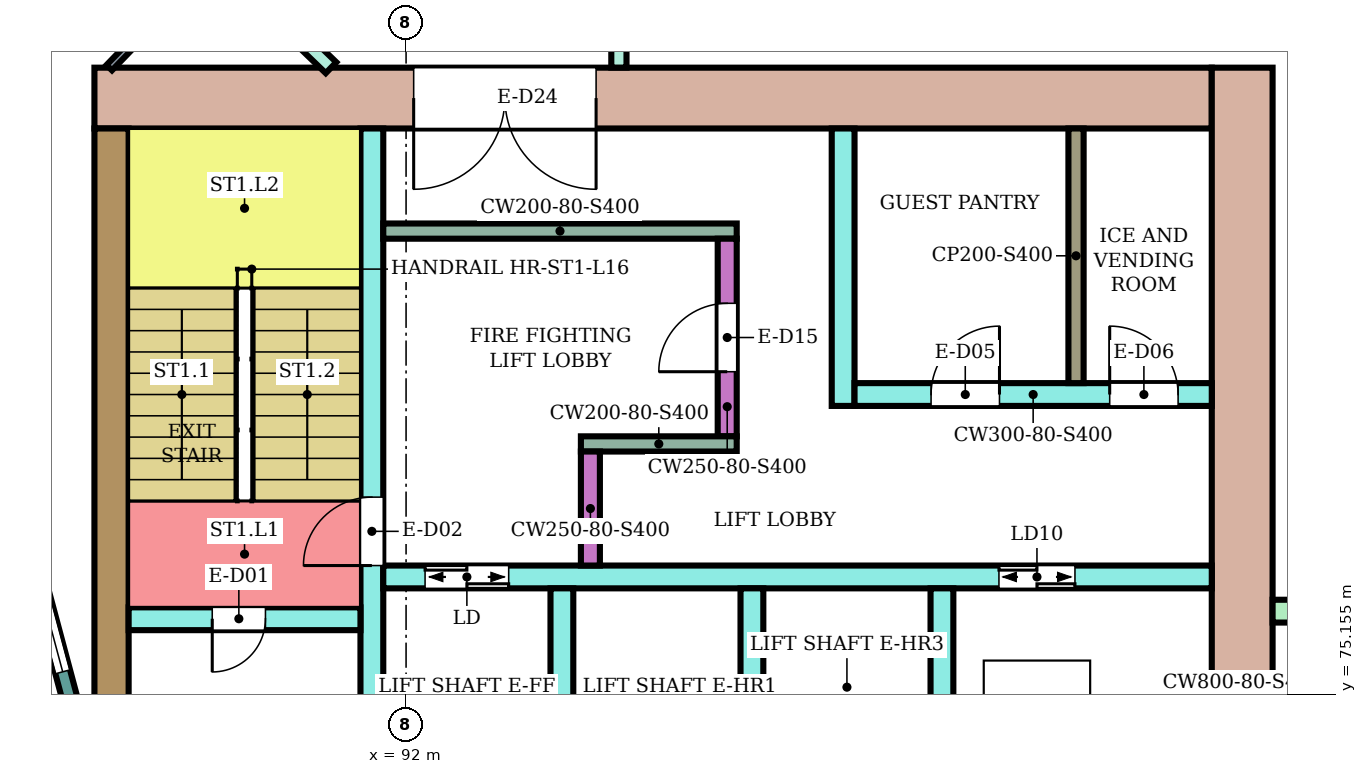
"""IFC4 building model, lengths in metres.
Left out: names, types, materials, properties, quantities, classifications, styles, units other than length and angle.
Written with IfcOpenShell. Run it as: python <this file> out.ifc"""

import sys

from ifc_helpers import new_model, si_unit, direction, frame, frame_2d, origin, place, context, subcontext, project, spatial, rectangle, extrude, element, fill, save


model = new_model("IFC4")
c1 = context("Model", 3, precision=1e-05, world=origin(), true_north=direction((0.0, 1.0)))
c2 = subcontext(c1, "Body", "Model", "MODEL_VIEW")
j1 = project(units=[si_unit("LENGTHUNIT", "METRE"), si_unit("PLANEANGLEUNIT", "RADIAN")], contexts=[c1])
p1 = place(None, origin())
s1 = spatial("IfcSite", under=j1, at=p1, CompositionType="ELEMENT")
p2 = place(p1, origin())
s2 = spatial("IfcBuilding", under=s1, at=p2, CompositionType="ELEMENT")
p3 = place(p2, frame((0.0, 0.0, 70.6)))
s3 = spatial("IfcBuildingStorey", under=s2, at=p3, CompositionType="ELEMENT", Elevation=70.6)
p4 = place(p3, frame((87.9, 83.0, 0.0), z_axis=(0.0, 0.0, 1.0), x_axis=(1.0, 0.0, 0.0)))
e1 = element("IfcWall", 1, at=p4, inside=s3, PredefinedType="SHEAR", context=c2, shape_type="SweptSolid", body=[
    extrude(rectangle(XDim=14.7, YDim=0.8, at=frame_2d((7.35, 0.0))), origin(), (0.0, 0.0, 1.0), 3.4),
])
p5 = place(p4, frame((4.2, 0.0, 0.0)))
e2 = element("IfcOpeningElement", 2, at=p5, cuts=e1, PredefinedType="OPENING", context=c2, shape_type="SweptSolid", body=[
    extrude(rectangle(XDim=2.4, YDim=2.4, at=frame_2d((1.2, 1.2))), frame((0.0, 0.41, 0.0), z_axis=(0.0, -1.0, 0.0), x_axis=(1.0, 0.0, 0.0)), (0.0, 0.0, 1.0), 0.82),
])
p6 = place(p3, frame((88.125, 75.0, 0.0), z_axis=(0.0, 0.0, 1.0), x_axis=(0.0, 1.0, 0.0)))
e3 = element("IfcWall", 3, at=p6, inside=s3, PredefinedType="SHEAR", context=c2, shape_type="SweptSolid", body=[
    extrude(rectangle(XDim=7.6, YDim=0.45, at=frame_2d((3.8, 0.0))), origin(), (0.0, 0.0, 1.0), 3.4),
])
p7 = place(p3, frame((103.0, 66.6, 0.0), z_axis=(0.0, 0.0, 1.0), x_axis=(0.0, 1.0, 0.0)))
e4 = element("IfcWall", 4, at=p7, inside=s3, PredefinedType="SHEAR", context=c2, shape_type="SweptSolid", body=[
    extrude(rectangle(XDim=16.8, YDim=0.8, at=frame_2d((8.4, 0.0))), origin(), (0.0, 0.0, 1.0), 3.4),
])
p8 = place(p3, frame((91.55, 75.0, 0.0), z_axis=(0.0, 0.0, 1.0), x_axis=(0.0, 1.0, 0.0)))
e5 = element("IfcWall", 5, at=p8, inside=s3, PredefinedType="SHEAR", context=c2, shape_type="SweptSolid", body=[
    extrude(rectangle(XDim=7.6, YDim=0.3, at=frame_2d((3.8, 0.0))), origin(), (0.0, 0.0, 1.0), 3.4),
])
p9 = place(p8, frame((1.85, 0.0, 0.0)))
e6 = element("IfcOpeningElement", 6, at=p9, cuts=e5, PredefinedType="OPENING", context=c2, shape_type="SweptSolid", body=[
    extrude(rectangle(XDim=0.9, YDim=2.1, at=frame_2d((0.45, 1.05))), frame((0.0, 0.16, 0.0), z_axis=(0.0, -1.0, 0.0), x_axis=(1.0, 0.0, 0.0)), (0.0, 0.0, 1.0), 0.32),
])
p10 = place(p3, frame((88.35, 76.15, 0.0), z_axis=(0.0, 0.0, 1.0), x_axis=(1.0, 0.0, 0.0)))
e7 = element("IfcWall", 7, at=p10, inside=s3, PredefinedType="SHEAR", context=c2, shape_type="SweptSolid", body=[
    extrude(rectangle(XDim=3.05, YDim=0.3, at=frame_2d((1.525, 0.0))), origin(), (0.0, 0.0, 1.0), 3.4),
])
p11 = place(p10, frame((1.1, 0.0, 0.0)))
e8 = element("IfcOpeningElement", 8, at=p11, cuts=e7, PredefinedType="OPENING", context=c2, shape_type="SweptSolid", body=[
    extrude(rectangle(XDim=0.7, YDim=2.0, at=frame_2d((0.35, 1.0))), frame((0.0, 0.16, 0.0), z_axis=(0.0, -1.0, 0.0), x_axis=(1.0, 0.0, 0.0)), (0.0, 0.0, 1.0), 0.32),
])
p12 = place(p3, frame((91.7, 76.7, 0.0), z_axis=(0.0, 0.0, 1.0), x_axis=(1.0, 0.0, 0.0)))
e9 = element("IfcWall", 9, at=p12, inside=s3, PredefinedType="SHEAR", context=c2, shape_type="SweptSolid", body=[
    extrude(rectangle(XDim=10.9, YDim=0.3, at=frame_2d((5.45, 0.0))), origin(), (0.0, 0.0, 1.0), 3.4),
])
p13 = place(p12, frame((0.55, 0.0, 0.0)))
e10 = element("IfcOpeningElement", 10, at=p13, cuts=e9, PredefinedType="OPENING", context=c2, shape_type="SweptSolid", body=[
    extrude(rectangle(XDim=1.1, YDim=2.1, at=frame_2d((0.55, 1.05))), frame((0.0, 0.16, 0.0), z_axis=(0.0, -1.0, 0.0), x_axis=(1.0, 0.0, 0.0)), (0.0, 0.0, 1.0), 0.32),
])
p14 = place(p12, frame((8.1, 0.0, 0.0)))
e11 = element("IfcOpeningElement", 11, at=p14, cuts=e9, PredefinedType="OPENING", context=c2, shape_type="SweptSolid", body=[
    extrude(rectangle(XDim=1.0, YDim=2.1, at=frame_2d((0.5, 1.05))), frame((0.0, 0.16, 0.0), z_axis=(0.0, -1.0, 0.0), x_axis=(1.0, 0.0, 0.0)), (0.0, 0.0, 1.0), 0.32),
])
for number, where, z_axis, x_axis in (
    (12, (94.05, 74.0, 0.0), (0.0, 0.0, 1.0), (0.0, 1.0, 0.0)),
    (13, (96.55, 74.0, 0.0), (0.0, 0.0, 1.0), (0.0, 1.0, 0.0)),
    (14, (99.05, 74.0, 0.0), (0.0, 0.0, 1.0), (0.0, 1.0, 0.0)),
):
    element("IfcWall", number, at=place(p3, frame(where, z_axis=z_axis, x_axis=x_axis)), inside=s3, PredefinedType="SHEAR", context=c2, shape_type="SweptSolid", body=[
        extrude(rectangle(XDim=2.55, YDim=0.3, at=frame_2d((1.275, 0.0))), origin(), (0.0, 0.0, 1.0), 3.4),
    ])
p15 = place(p3, frame((91.7, 81.25, 0.0), z_axis=(0.0, 0.0, 1.0), x_axis=(1.0, 0.0, 0.0)))
e15 = element("IfcWall", 15, at=p15, inside=s3, PredefinedType="SHEAR", context=c2, shape_type="SweptSolid", body=[
    extrude(rectangle(XDim=4.65, YDim=0.2, at=frame_2d((2.325, 0.0))), origin(), (0.0, 0.0, 1.0), 3.4),
])
p16 = place(p3, frame((96.225, 78.55, 0.0), z_axis=(0.0, 0.0, 1.0), x_axis=(0.0, 1.0, 0.0)))
e16 = element("IfcWall", 16, at=p16, inside=s3, PredefinedType="SHEAR", context=c2, shape_type="SweptSolid", body=[
    extrude(rectangle(XDim=2.6, YDim=0.25, at=frame_2d((1.3, 0.0))), origin(), (0.0, 0.0, 1.0), 3.4),
])
p17 = place(p16, frame((0.85, 0.0, 0.0)))
e17 = element("IfcOpeningElement", 17, at=p17, cuts=e16, PredefinedType="OPENING", context=c2, shape_type="SweptSolid", body=[
    extrude(rectangle(XDim=0.9, YDim=2.1, at=frame_2d((0.45, 1.05))), frame((0.0, 0.135, 0.0), z_axis=(0.0, -1.0, 0.0), x_axis=(1.0, 0.0, 0.0)), (0.0, 0.0, 1.0), 0.27),
])
p18 = place(p3, frame((94.3, 78.45, 0.0), z_axis=(0.0, 0.0, 1.0), x_axis=(1.0, 0.0, 0.0)))
e18 = element("IfcWall", 18, at=p18, inside=s3, PredefinedType="SHEAR", context=c2, shape_type="SweptSolid", body=[
    extrude(rectangle(XDim=2.05, YDim=0.2, at=frame_2d((1.025, 0.0))), origin(), (0.0, 0.0, 1.0), 3.4),
])
p19 = place(p3, frame((94.425, 76.85, 0.0), z_axis=(0.0, 0.0, 1.0), x_axis=(0.0, 1.0, 0.0)))
e19 = element("IfcWall", 19, at=p19, inside=s3, PredefinedType="SHEAR", context=c2, shape_type="SweptSolid", body=[
    extrude(rectangle(XDim=1.5, YDim=0.25, at=frame_2d((0.75, 0.0))), origin(), (0.0, 0.0, 1.0), 3.4),
])
p20 = place(p3, frame((97.75, 78.95, 0.0), z_axis=(0.0, 0.0, 1.0), x_axis=(0.0, 1.0, 0.0)))
e20 = element("IfcWall", 20, at=p20, inside=s3, PredefinedType="SHEAR", context=c2, shape_type="SweptSolid", body=[
    extrude(rectangle(XDim=3.65, YDim=0.3, at=frame_2d((1.825, 0.0))), origin(), (0.0, 0.0, 1.0), 3.4),
])
p21 = place(p3, frame((97.9, 79.1, 0.0), z_axis=(0.0, 0.0, 1.0), x_axis=(1.0, 0.0, 0.0)))
e21 = element("IfcWall", 21, at=p21, inside=s3, PredefinedType="SHEAR", context=c2, shape_type="SweptSolid", body=[
    extrude(rectangle(XDim=4.7, YDim=0.3, at=frame_2d((2.35, 0.0))), origin(), (0.0, 0.0, 1.0), 3.4),
])
p22 = place(p21, frame((1.007, 0.0, 0.0)))
e22 = element("IfcOpeningElement", 22, at=p22, cuts=e21, PredefinedType="OPENING", context=c2, shape_type="SweptSolid", body=[
    extrude(rectangle(XDim=0.9, YDim=2.1, at=frame_2d((0.45, 1.05))), frame((0.0, 0.16, 0.0), z_axis=(0.0, -1.0, 0.0), x_axis=(1.0, 0.0, 0.0)), (0.0, 0.0, 1.0), 0.32),
])
p23 = place(p21, frame((3.357, 0.0, 0.0)))
e23 = element("IfcOpeningElement", 23, at=p23, cuts=e21, PredefinedType="OPENING", context=c2, shape_type="SweptSolid", body=[
    extrude(rectangle(XDim=0.9, YDim=2.1, at=frame_2d((0.45, 1.05))), frame((0.0, 0.16, 0.0), z_axis=(0.0, -1.0, 0.0), x_axis=(1.0, 0.0, 0.0)), (0.0, 0.0, 1.0), 0.32),
])
p24 = place(p3, frame((103.4, 76.25, 0.0), z_axis=(0.0, 0.0, 1.0), x_axis=(1.0, 0.0, 0.0)))
e24 = element("IfcWall", 24, at=p24, inside=s3, PredefinedType="NOTDEFINED", context=c2, shape_type="SweptSolid", body=[
    extrude(rectangle(XDim=2.416, YDim=0.3, at=frame_2d((1.208, 0.0))), origin(), (0.0, 0.0, 1.0), 3.8),
])
p25 = place(p3, frame((87.604, 75.0, 0.0), z_axis=(0.0, 0.0, 1.0), x_axis=(-0.258789828301, 0.965933654434, 0.0)))
e25 = element("IfcWall", 25, at=p25, inside=s3, PredefinedType="NOTDEFINED", context=c2, shape_type="SweptSolid", body=[
    extrude(rectangle(XDim=3.936, YDim=0.2, at=frame_2d((1.968, 0.0))), origin(), (0.0, 0.0, 1.0), 3.8),
])
p26 = place(p25, frame((0.468, 0.0, 0.9)))
e26 = element("IfcOpeningElement", 26, at=p26, cuts=e25, PredefinedType="OPENING", context=c2, shape_type="SweptSolid", body=[
    extrude(rectangle(XDim=3.0, YDim=2.3, at=frame_2d((1.5, 1.15))), frame((0.0, 0.11, 0.0), z_axis=(0.0, -1.0, 0.0), x_axis=(1.0, 0.0, 0.0)), (0.0, 0.0, 1.0), 0.22),
])
p27 = place(p3, frame((87.064, 87.211, 0.0), z_axis=(0.0, 0.0, 1.0), x_axis=(0.719540958932, -0.694450004262, 0.0)))
e27 = element("IfcWall", 27, at=p27, inside=s3, PredefinedType="PARTITIONING", context=c2, shape_type="SweptSolid", body=[
    extrude(rectangle(XDim=5.488, YDim=0.2, at=frame_2d((2.744, 0.0))), origin(), (0.0, 0.0, 1.0), 3.35),
])
p28 = place(p27, frame((0.55, 0.0, 0.0)))
e28 = element("IfcOpeningElement", 28, at=p28, cuts=e27, PredefinedType="OPENING", context=c2, shape_type="SweptSolid", body=[
    extrude(rectangle(XDim=1.0, YDim=2.1, at=frame_2d((0.5, 1.05))), frame((0.0, 0.11, 0.0), z_axis=(0.0, -1.0, 0.0), x_axis=(1.0, 0.0, 0.0)), (0.0, 0.0, 1.0), 0.22),
])
p29 = place(p3, frame((94.8, 83.401, 0.0), z_axis=(0.0, 0.0, 1.0), x_axis=(0.0, 1.0, 0.0)))
e29 = element("IfcWall", 29, at=p29, inside=s3, PredefinedType="PARTITIONING", context=c2, shape_type="SweptSolid", body=[
    extrude(rectangle(XDim=1.499, YDim=0.2, at=frame_2d((0.75, 0.0))), origin(), (0.0, 0.0, 1.0), 3.35),
])
p30 = place(p3, frame((88.095, 83.4, 0.0), z_axis=(0.0, 0.0, 1.0), x_axis=(0.694447472534, 0.719543402368, 0.0)))
e30 = element("IfcWall", 30, at=p30, inside=s3, PredefinedType="PARTITIONING", context=c2, shape_type="SweptSolid", body=[
    extrude(rectangle(XDim=1.926, YDim=0.1, at=frame_2d((0.963, 0.0))), origin(), (0.0, 0.0, 1.0), 3.35),
])
p31 = place(p30, frame((0.613, 0.0, 0.0)))
e31 = element("IfcOpeningElement", 31, at=p31, cuts=e30, PredefinedType="OPENING", context=c2, shape_type="SweptSolid", body=[
    extrude(rectangle(XDim=0.8, YDim=2.1, at=frame_2d((0.4, 1.05))), frame((0.0, 0.06, 0.0), z_axis=(0.0, -1.0, 0.0), x_axis=(1.0, 0.0, 0.0)), (0.0, 0.0, 1.0), 0.12),
])
p32 = place(p3, frame((100.814, 79.25, 0.0), z_axis=(0.0, 0.0, 1.0), x_axis=(0.0, 1.0, 0.0)))
e32 = element("IfcWall", 32, at=p32, inside=s3, PredefinedType="PARTITIONING", context=c2, shape_type="SweptSolid", body=[
    extrude(rectangle(XDim=3.35, YDim=0.2, at=frame_2d((1.675, 0.0))), origin(), (0.0, 0.0, 1.0), 3.4),
])
p33 = place(p26, origin())
e33 = element("IfcWindow", 33, at=p33, inside=s3, PartitioningType="SINGLE_PANEL", PredefinedType="WINDOW", context=c2, shape_type="SweptSolid", body=[
    extrude(rectangle(XDim=3.0, YDim=2.3, at=frame_2d((1.5, 1.15))), frame((0.0, 0.03, 0.0), z_axis=(0.0, -1.0, 0.0), x_axis=(1.0, 0.0, 0.0)), (0.0, 0.0, 1.0), 0.06),
])
fill(e26, e33)
p34 = place(p11, frame((0.7, 0.0, 0.0), z_axis=(0.0, 0.0, 1.0), x_axis=(-1.0, 0.0, 0.0)))
e34 = element("IfcDoor", 34, at=p34, inside=s3, OperationType="SINGLE_SWING_RIGHT", PredefinedType="DOOR", context=c2, shape_type="SweptSolid", body=[
    extrude(rectangle(XDim=0.7, YDim=2.0, at=frame_2d((0.35, 1.0))), frame((0.0, 0.025, 0.0), z_axis=(0.0, -1.0, 0.0), x_axis=(1.0, 0.0, 0.0)), (0.0, 0.0, 1.0), 0.05),
])
fill(e8, e34)
p35 = place(p9, origin())
e35 = element("IfcDoor", 35, at=p35, inside=s3, OperationType="SINGLE_SWING_LEFT", PredefinedType="DOOR", context=c2, shape_type="SweptSolid", body=[
    extrude(rectangle(XDim=0.9, YDim=2.1, at=frame_2d((0.45, 1.05))), frame((0.0, 0.025, 0.0), z_axis=(0.0, -1.0, 0.0), x_axis=(1.0, 0.0, 0.0)), (0.0, 0.0, 1.0), 0.05),
])
fill(e6, e35)
p36 = place(p13, origin())
e36 = element("IfcDoor", 36, at=p36, inside=s3, OperationType="DOUBLE_DOOR_SLIDING", PredefinedType="DOOR", context=c2, shape_type="SweptSolid", body=[
    extrude(rectangle(XDim=1.1, YDim=2.1, at=frame_2d((0.55, 1.05))), frame((0.0, 0.025, 0.0), z_axis=(0.0, -1.0, 0.0), x_axis=(1.0, 0.0, 0.0)), (0.0, 0.0, 1.0), 0.05),
])
fill(e10, e36)
p37 = place(p14, origin())
e37 = element("IfcDoor", 37, at=p37, inside=s3, OperationType="DOUBLE_DOOR_SLIDING", PredefinedType="DOOR", context=c2, shape_type="SweptSolid", body=[
    extrude(rectangle(XDim=1.0, YDim=2.1, at=frame_2d((0.5, 1.05))), frame((0.0, 0.025, 0.0), z_axis=(0.0, -1.0, 0.0), x_axis=(1.0, 0.0, 0.0)), (0.0, 0.0, 1.0), 0.05),
])
fill(e11, e37)
p38 = place(p17, origin())
e38 = element("IfcDoor", 38, at=p38, inside=s3, OperationType="SINGLE_SWING_LEFT", PredefinedType="DOOR", context=c2, shape_type="SweptSolid", body=[
    extrude(rectangle(XDim=0.9, YDim=2.1, at=frame_2d((0.45, 1.05))), frame((0.0, 0.025, 0.0), z_axis=(0.0, -1.0, 0.0), x_axis=(1.0, 0.0, 0.0)), (0.0, 0.0, 1.0), 0.05),
])
fill(e17, e38)
p39 = place(p22, origin())
e39 = element("IfcDoor", 39, at=p39, inside=s3, OperationType="SINGLE_SWING_RIGHT", PredefinedType="DOOR", context=c2, shape_type="SweptSolid", body=[
    extrude(rectangle(XDim=0.9, YDim=2.1, at=frame_2d((0.45, 1.05))), frame((0.0, 0.025, 0.0), z_axis=(0.0, -1.0, 0.0), x_axis=(1.0, 0.0, 0.0)), (0.0, 0.0, 1.0), 0.05),
])
fill(e22, e39)
p40 = place(p23, origin())
e40 = element("IfcDoor", 40, at=p40, inside=s3, OperationType="SINGLE_SWING_LEFT", PredefinedType="DOOR", context=c2, shape_type="SweptSolid", body=[
    extrude(rectangle(XDim=0.9, YDim=2.1, at=frame_2d((0.45, 1.05))), frame((0.0, 0.025, 0.0), z_axis=(0.0, -1.0, 0.0), x_axis=(1.0, 0.0, 0.0)), (0.0, 0.0, 1.0), 0.05),
])
fill(e23, e40)
p41 = place(p5, frame((2.4, 0.0, 0.0), z_axis=(0.0, 0.0, 1.0), x_axis=(-1.0, 0.0, 0.0)))
e41 = element("IfcDoor", 41, at=p41, inside=s3, OperationType="DOUBLE_DOOR_SINGLE_SWING", PredefinedType="DOOR", context=c2, shape_type="SweptSolid", body=[
    extrude(rectangle(XDim=2.4, YDim=2.4, at=frame_2d((1.2, 1.2))), frame((0.0, 0.025, 0.0), z_axis=(0.0, -1.0, 0.0), x_axis=(1.0, 0.0, 0.0)), (0.0, 0.0, 1.0), 0.05),
])
fill(e2, e41)
save(model, sys.argv[1])
